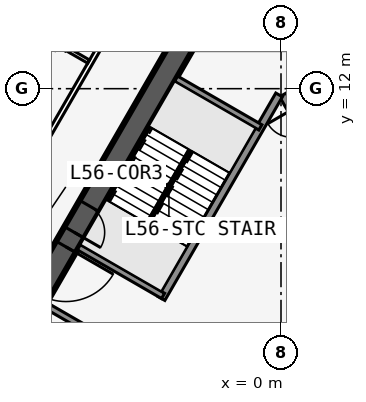
"""IFC4 building model, lengths in metres.
Left out: names, types, materials, properties, quantities, classifications, styles, units other than length and angle.
Written with IfcOpenShell. Run it as: python <this file> out.ifc"""

import sys

from ifc_helpers import new_model, si_unit, direction, frame, frame_2d, origin, place, context, subcontext, project, spatial, rectangle, extrude, element, fill, save


model = new_model("IFC4")
c1 = context("Model", 3, precision=1e-05, world=origin(), true_north=direction((0.0, 1.0)))
c2 = subcontext(c1, "Body", "Model", "MODEL_VIEW")
j1 = project(units=[si_unit("LENGTHUNIT", "METRE"), si_unit("PLANEANGLEUNIT", "RADIAN")], contexts=[c1])
p1 = place(None, origin())
s1 = spatial("IfcSite", under=j1, at=p1, CompositionType="ELEMENT")
p2 = place(p1, origin())
s2 = spatial("IfcBuilding", under=s1, at=p2, CompositionType="ELEMENT")
p3 = place(p2, frame((0.0, 0.0, 211.7)))
s3 = spatial("IfcBuildingStorey", under=s2, at=p3, CompositionType="ELEMENT", Elevation=211.7)
p4 = place(p3, frame((16.5, -9.526, 0.0), z_axis=(0.0, 0.0, 1.0), x_axis=(-0.499999749417, 0.866025548458, 0.0)))
e1 = element("IfcWall", 1, at=p4, inside=s3, PredefinedType="SHEAR", context=c2, shape_type="SweptSolid", body=[
    extrude(rectangle(XDim=33.0, YDim=0.75, at=frame_2d((16.5, 0.0))), origin(), (0.0, 0.0, 1.0), 3.6),
])
p5 = place(p4, frame((14.15, 0.0, 0.0)))
e2 = element("IfcOpeningElement", 2, at=p5, cuts=e1, PredefinedType="OPENING", context=c2, shape_type="SweptSolid", body=[
    extrude(rectangle(XDim=1.8, YDim=2.13, at=frame_2d((0.9, 1.065))), frame((0.0, 0.385, 0.0), z_axis=(0.0, -1.0, 0.0), x_axis=(1.0, 0.0, 0.0)), (0.0, 0.0, 1.0), 0.77),
])
p6 = place(p4, frame((12.6, 0.0, 0.0)))
e3 = element("IfcOpeningElement", 3, at=p6, cuts=e1, PredefinedType="OPENING", context=c2, shape_type="SweptSolid", body=[
    extrude(rectangle(XDim=1.0, YDim=2.13, at=frame_2d((0.5, 1.065))), frame((0.0, 0.385, 0.0), z_axis=(0.0, -1.0, 0.0), x_axis=(1.0, 0.0, 0.0)), (0.0, 0.0, 1.0), 0.77),
])
p7 = place(p3, frame((5.379, 2.586, 0.0), z_axis=(0.0, 0.0, 1.0), x_axis=(-0.500001375892, 0.866024609411, 0.0)))
e4 = element("IfcWall", 4, at=p7, inside=s3, PredefinedType="SOLIDWALL", context=c2, shape_type="SweptSolid", body=[
    extrude(rectangle(XDim=10.633, YDim=0.25, at=frame_2d((5.316, 0.0))), origin(), (0.0, 0.0, 1.0), 3.435),
])
p8 = place(p7, frame((9.164, 0.0, 0.0)))
e5 = element("IfcOpeningElement", 5, at=p8, cuts=e4, PredefinedType="OPENING", context=c2, shape_type="SweptSolid", body=[
    extrude(rectangle(XDim=0.9, YDim=2.13, at=frame_2d((0.45, 1.065))), frame((0.0, 0.135, 0.0), z_axis=(0.0, -1.0, 0.0), x_axis=(1.0, 0.0, 0.0)), (0.0, 0.0, 1.0), 0.27),
])
p9 = place(p7, frame((1.0, 0.0, 0.0)))
e6 = element("IfcOpeningElement", 6, at=p9, cuts=e4, PredefinedType="OPENING", context=c2, shape_type="SweptSolid", body=[
    extrude(rectangle(XDim=1.1, YDim=2.13, at=frame_2d((0.55, 1.065))), frame((0.0, 0.135, 0.0), z_axis=(0.0, -1.0, 0.0), x_axis=(1.0, 0.0, 0.0)), (0.0, 0.0, 1.0), 0.27),
])
p10 = place(p7, frame((3.9, 0.0, 0.0)))
e7 = element("IfcOpeningElement", 7, at=p10, cuts=e4, PredefinedType="OPENING", context=c2, shape_type="SweptSolid", body=[
    extrude(rectangle(XDim=1.1, YDim=2.13, at=frame_2d((0.55, 1.065))), frame((0.0, 0.135, 0.0), z_axis=(0.0, -1.0, 0.0), x_axis=(1.0, 0.0, 0.0)), (0.0, 0.0, 1.0), 0.27),
])
p11 = place(p7, frame((6.8, 0.0, 0.0)))
e8 = element("IfcOpeningElement", 8, at=p11, cuts=e4, PredefinedType="OPENING", context=c2, shape_type="SweptSolid", body=[
    extrude(rectangle(XDim=1.1, YDim=2.13, at=frame_2d((0.55, 1.065))), frame((0.0, 0.135, 0.0), z_axis=(0.0, -1.0, 0.0), x_axis=(1.0, 0.0, 0.0)), (0.0, 0.0, 1.0), 0.27),
])
p12 = place(p3, frame((0.0, 19.052, 0.0), z_axis=(0.0, 0.0, 1.0), x_axis=(-0.499999749417, -0.866025548458, 0.0)))
e9 = element("IfcWall", 9, at=p12, inside=s3, PredefinedType="SHEAR", context=c2, shape_type="SweptSolid", body=[
    extrude(rectangle(XDim=33.0, YDim=0.75, at=frame_2d((16.5, 0.0))), origin(), (0.0, 0.0, 1.0), 3.6),
])
p13 = place(p12, frame((14.15, 0.0, 0.0)))
e10 = element("IfcOpeningElement", 10, at=p13, cuts=e9, PredefinedType="OPENING", context=c2, shape_type="SweptSolid", body=[
    extrude(rectangle(XDim=1.8, YDim=2.13, at=frame_2d((0.9, 1.065))), frame((0.0, 0.385, 0.0), z_axis=(0.0, -1.0, 0.0), x_axis=(1.0, 0.0, 0.0)), (0.0, 0.0, 1.0), 0.77),
])
p14 = place(p12, frame((12.6, 0.0, 0.0)))
e11 = element("IfcOpeningElement", 11, at=p14, cuts=e9, PredefinedType="OPENING", context=c2, shape_type="SweptSolid", body=[
    extrude(rectangle(XDim=1.0, YDim=2.13, at=frame_2d((0.5, 1.065))), frame((0.0, 0.385, 0.0), z_axis=(0.0, -1.0, 0.0), x_axis=(1.0, 0.0, 0.0)), (0.0, 0.0, 1.0), 0.77),
])
p15 = place(p3, frame((-0.062, 11.794, 0.0), z_axis=(0.0, 0.0, 1.0), x_axis=(-0.500006680225, -0.86602154692, 0.0)))
e12 = element("IfcWall", 12, at=p15, inside=s3, PredefinedType="SOLIDWALL", context=c2, shape_type="SweptSolid", body=[
    extrude(rectangle(XDim=7.733, YDim=0.25, at=frame_2d((3.866, 0.0))), origin(), (0.0, 0.0, 1.0), 3.435),
])
for number, where, z_axis, x_axis in (
    (13, (-0.679, 10.727, 0.0), (0.0, 0.0, 1.0), (-0.866, 0.5, 0.0)),
    (14, (-3.879, 5.184, 0.0), (0.0, 0.0, 1.0), (-0.866, 0.5, 0.0)),
    (15, (-4.979, 3.279, 0.0), (0.0, 0.0, 1.0), (-0.866, 0.5, 0.0)),
):
    element("IfcWall", number, at=place(p3, frame(where, z_axis=z_axis, x_axis=x_axis)), inside=s3, PredefinedType="SOLIDWALL", context=c2, shape_type="SweptSolid", body=[
        extrude(rectangle(XDim=3.2, YDim=0.2, at=frame_2d((1.6, 0.0))), origin(), (0.0, 0.0, 1.0), 3.435),
    ])
p16 = place(p3, frame((-0.425, 22.966, 0.0), z_axis=(0.0, 0.0, 1.0), x_axis=(-0.500000265775, -0.866025250339, 0.0)))
e16 = element("IfcWall", 16, at=p16, inside=s3, PredefinedType="PARTITIONING", context=c2, shape_type="SweptSolid", body=[
    extrude(rectangle(XDim=39.354, YDim=0.15, at=frame_2d((19.677, 0.0))), origin(), (0.0, 0.0, 1.0), 3.435),
])
p17 = place(p16, frame((1.102, 0.0, 0.0)))
e17 = element("IfcOpeningElement", 17, at=p17, cuts=e16, PredefinedType="OPENING", context=c2, shape_type="SweptSolid", body=[
    extrude(rectangle(XDim=0.95, YDim=2.13, at=frame_2d((0.475, 1.065))), frame((0.0, 0.085, 0.0), z_axis=(0.0, -1.0, 0.0), x_axis=(1.0, 0.0, 0.0)), (0.0, 0.0, 1.0), 0.17),
])
p18 = place(p16, frame((6.702, 0.0, 0.0)))
e18 = element("IfcOpeningElement", 18, at=p18, cuts=e16, PredefinedType="OPENING", context=c2, shape_type="SweptSolid", body=[
    extrude(rectangle(XDim=0.95, YDim=2.13, at=frame_2d((0.475, 1.065))), frame((0.0, 0.085, 0.0), z_axis=(0.0, -1.0, 0.0), x_axis=(1.0, 0.0, 0.0)), (0.0, 0.0, 1.0), 0.17),
])
p19 = place(p16, frame((16.702, 0.0, 0.0)))
e19 = element("IfcOpeningElement", 19, at=p19, cuts=e16, PredefinedType="OPENING", context=c2, shape_type="SweptSolid", body=[
    extrude(rectangle(XDim=0.95, YDim=2.13, at=frame_2d((0.475, 1.065))), frame((0.0, 0.085, 0.0), z_axis=(0.0, -1.0, 0.0), x_axis=(1.0, 0.0, 0.0)), (0.0, 0.0, 1.0), 0.17),
])
p20 = place(p16, frame((26.102, 0.0, 0.0)))
e20 = element("IfcOpeningElement", 20, at=p20, cuts=e16, PredefinedType="OPENING", context=c2, shape_type="SweptSolid", body=[
    extrude(rectangle(XDim=0.95, YDim=2.13, at=frame_2d((0.475, 1.065))), frame((0.0, 0.085, 0.0), z_axis=(0.0, -1.0, 0.0), x_axis=(1.0, 0.0, 0.0)), (0.0, 0.0, 1.0), 0.17),
])
p21 = place(p16, frame((32.302, 0.0, 0.0)))
e21 = element("IfcOpeningElement", 21, at=p21, cuts=e16, PredefinedType="OPENING", context=c2, shape_type="SweptSolid", body=[
    extrude(rectangle(XDim=0.95, YDim=2.13, at=frame_2d((0.475, 1.065))), frame((0.0, 0.085, 0.0), z_axis=(0.0, -1.0, 0.0), x_axis=(1.0, 0.0, 0.0)), (0.0, 0.0, 1.0), 0.17),
])
p22 = place(p16, frame((37.302, 0.0, 0.0)))
e22 = element("IfcOpeningElement", 22, at=p22, cuts=e16, PredefinedType="OPENING", context=c2, shape_type="SweptSolid", body=[
    extrude(rectangle(XDim=0.95, YDim=2.13, at=frame_2d((0.475, 1.065))), frame((0.0, 0.085, 0.0), z_axis=(0.0, -1.0, 0.0), x_axis=(1.0, 0.0, 0.0)), (0.0, 0.0, 1.0), 0.17),
])
p23 = place(p3, frame((-6.329, 12.891, 0.0), z_axis=(0.0, 0.0, 1.0), x_axis=(-0.866035715982, 0.499982138324, 0.0)))
e23 = element("IfcWall", 23, at=p23, inside=s3, PredefinedType="PLUMBINGWALL", context=c2, shape_type="SweptSolid", body=[
    extrude(rectangle(XDim=2.74, YDim=0.12, at=frame_2d((1.37, 0.0))), origin(), (0.0, 0.0, 1.0), 3.435),
])
p24 = place(p23, frame((1.55, 0.0, 0.0)))
e24 = element("IfcOpeningElement", 24, at=p24, cuts=e23, PredefinedType="OPENING", context=c2, shape_type="SweptSolid", body=[
    extrude(rectangle(XDim=0.9, YDim=2.13, at=frame_2d((0.45, 1.065))), frame((0.0, 0.07, 0.0), z_axis=(0.0, -1.0, 0.0), x_axis=(1.0, 0.0, 0.0)), (0.0, 0.0, 1.0), 0.14),
])
p25 = place(p3, frame((-2.988, 9.978, 0.0), z_axis=(0.0, 0.0, 1.0), x_axis=(-0.499992232847, -0.866029888106, 0.0)))
e25 = element("IfcWall", 25, at=p25, inside=s3, PredefinedType="SOLIDWALL", context=c2, shape_type="SweptSolid", body=[
    extrude(rectangle(XDim=2.794, YDim=0.1, at=frame_2d((1.397, 0.0))), origin(), (0.0, 0.0, 1.0), 3.6),
])
p26 = place(p13, origin())
e26 = element("IfcDoor", 26, at=p26, inside=s3, OperationType="DOUBLE_DOOR_SINGLE_SWING", PredefinedType="DOOR", context=c2, shape_type="SweptSolid", body=[
    extrude(rectangle(XDim=1.8, YDim=2.13, at=frame_2d((0.9, 1.065))), frame((0.0, 0.025, 0.0), z_axis=(0.0, -1.0, 0.0), x_axis=(1.0, 0.0, 0.0)), (0.0, 0.0, 1.0), 0.05),
])
fill(e10, e26)
p27 = place(p14, origin())
e27 = element("IfcDoor", 27, at=p27, inside=s3, OperationType="SINGLE_SWING_RIGHT", PredefinedType="DOOR", context=c2, shape_type="SweptSolid", body=[
    extrude(rectangle(XDim=1.0, YDim=2.13, at=frame_2d((0.5, 1.065))), frame((0.0, 0.025, 0.0), z_axis=(0.0, -1.0, 0.0), x_axis=(1.0, 0.0, 0.0)), (0.0, 0.0, 1.0), 0.05),
])
fill(e11, e27)
save(model, sys.argv[1])
